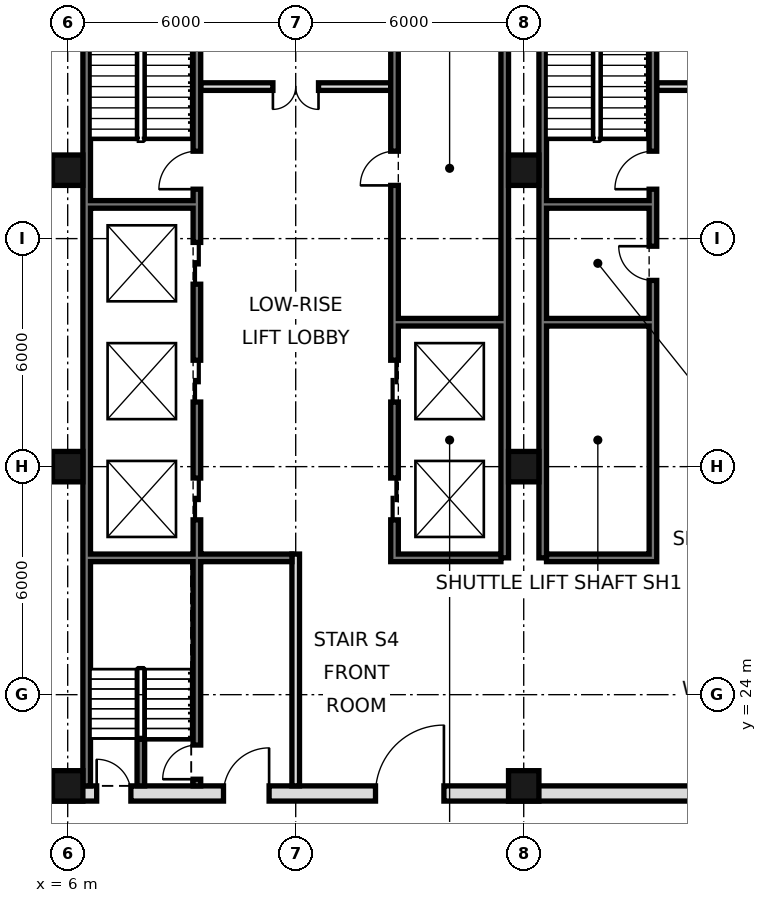
"""IFC4 building model, lengths in metres.
Left out: names, types, materials, properties, quantities, classifications, styles, units other than length and angle.
Written with IfcOpenShell. Run it as: python <this file> out.ifc"""

import sys

from ifc_helpers import new_model, si_unit, direction, frame, frame_2d, origin, origin_2d, place, context, subcontext, project, spatial, rectangle, hollow_rectangle, extrude, element, fill, save


model = new_model("IFC4")
c1 = context("Model", 3, precision=1e-05, world=origin(), true_north=direction((0.0, 1.0)))
c2 = subcontext(c1, "Body", "Model", "MODEL_VIEW")
j1 = project(units=[si_unit("LENGTHUNIT", "METRE"), si_unit("PLANEANGLEUNIT", "RADIAN")], contexts=[c1])
p1 = place(None, origin())
s1 = spatial("IfcSite", under=j1, at=p1, CompositionType="ELEMENT")
p2 = place(p1, origin())
s2 = spatial("IfcBuilding", under=s1, at=p2, CompositionType="ELEMENT")
p3 = place(p2, frame((0.0, 0.0, 44.4)))
s3 = spatial("IfcBuildingStorey", under=s2, at=p3, CompositionType="ELEMENT", Elevation=44.4)
for number, where, z_axis, x_axis in (
    (1, (6.0, 21.6, 0.0), (0.0, 0.0, 1.0), (1.0, 0.0, 0.0)),
    (2, (6.0, 30.0, 0.0), (0.0, 0.0, 1.0), (1.0, 0.0, 0.0)),
    (3, (6.0, 37.8, 0.0), (0.0, 0.0, 1.0), (1.0, 0.0, 0.0)),
    (4, (18.0, 21.6, 0.0), (0.0, 0.0, 1.0), (1.0, 0.0, 0.0)),
    (5, (18.0, 30.0, 0.0), (0.0, 0.0, 1.0), (1.0, 0.0, 0.0)),
    (6, (18.0, 37.8, 0.0), (0.0, 0.0, 1.0), (1.0, 0.0, 0.0)),
):
    element("IfcColumn", number, at=place(p3, frame(where, z_axis=z_axis, x_axis=x_axis)), inside=s3, PredefinedType="COLUMN", context=c2, shape_type="SweptSolid", body=[
        extrude(hollow_rectangle(XDim=0.8, YDim=0.8, WallThickness=0.07, at=origin_2d()), origin(), (0.0, 0.0, 1.0), 5.4),
    ])
p4 = place(p3, frame((6.5, 21.6, 0.0), z_axis=(0.0, 0.0, 1.0), x_axis=(0.0, 1.0, 0.0)))
e7 = element("IfcWall", 7, at=p4, inside=s3, PredefinedType="SOLIDWALL", context=c2, shape_type="SweptSolid", body=[
    extrude(rectangle(XDim=23.5, YDim=0.2, at=frame_2d((11.75, 0.0))), origin(), (0.0, 0.0, 1.0), 5.22),
])
for number, where, z_axis, x_axis in (
    (8, (17.5, 27.6, 0.0), (0.0, 0.0, 1.0), (0.0, 1.0, 0.0)),
    (9, (18.5, 27.6, 0.0), (0.0, 0.0, 1.0), (0.0, 1.0, 0.0)),
):
    element("IfcWall", number, at=place(p3, frame(where, z_axis=z_axis, x_axis=x_axis)), inside=s3, PredefinedType="SOLIDWALL", context=c2, shape_type="SweptSolid", body=[
        extrude(rectangle(XDim=17.5, YDim=0.2, at=frame_2d((8.75, 0.0))), origin(), (0.0, 0.0, 1.0), 5.22),
    ])
p5 = place(p3, frame((5.6, 21.4, 0.0), z_axis=(0.0, 0.0, 1.0), x_axis=(1.0, 0.0, 0.0)))
e10 = element("IfcWall", 10, at=p5, inside=s3, PredefinedType="SOLIDWALL", context=c2, shape_type="SweptSolid", body=[
    extrude(rectangle(XDim=36.8, YDim=0.4, at=frame_2d((18.4, 0.0))), origin(), (0.0, 0.0, 1.0), 5.22),
])
p6 = place(p5, frame((8.5, 0.0, 0.0)))
e11 = element("IfcOpeningElement", 11, at=p6, cuts=e10, PredefinedType="OPENING", context=c2, shape_type="SweptSolid", body=[
    extrude(rectangle(XDim=1.8, YDim=2.1, at=frame_2d((0.9, 1.05))), frame((0.0, 0.21, 0.0), z_axis=(0.0, -1.0, 0.0), x_axis=(1.0, 0.0, 0.0)), (0.0, 0.0, 1.0), 0.42),
])
p7 = place(p5, frame((17.5, 0.0, 0.0)))
e12 = element("IfcOpeningElement", 12, at=p7, cuts=e10, PredefinedType="OPENING", context=c2, shape_type="SweptSolid", body=[
    extrude(rectangle(XDim=1.8, YDim=2.1, at=frame_2d((0.9, 1.05))), frame((0.0, 0.21, 0.0), z_axis=(0.0, -1.0, 0.0), x_axis=(1.0, 0.0, 0.0)), (0.0, 0.0, 1.0), 0.42),
])
p8 = place(p5, frame((26.5, 0.0, 0.0)))
e13 = element("IfcOpeningElement", 13, at=p8, cuts=e10, PredefinedType="OPENING", context=c2, shape_type="SweptSolid", body=[
    extrude(rectangle(XDim=1.8, YDim=2.1, at=frame_2d((0.9, 1.05))), frame((0.0, 0.21, 0.0), z_axis=(0.0, -1.0, 0.0), x_axis=(1.0, 0.0, 0.0)), (0.0, 0.0, 1.0), 0.42),
])
p9 = place(p5, frame((4.5, 0.0, 0.0)))
e14 = element("IfcOpeningElement", 14, at=p9, cuts=e10, PredefinedType="OPENING", context=c2, shape_type="SweptSolid", body=[
    extrude(rectangle(XDim=1.2, YDim=2.1, at=frame_2d((0.6, 1.05))), frame((0.0, 0.21, 0.0), z_axis=(0.0, -1.0, 0.0), x_axis=(1.0, 0.0, 0.0)), (0.0, 0.0, 1.0), 0.42),
])
p10 = place(p5, frame((31.1, 0.0, 0.0)))
e15 = element("IfcOpeningElement", 15, at=p10, cuts=e10, PredefinedType="OPENING", context=c2, shape_type="SweptSolid", body=[
    extrude(rectangle(XDim=1.2, YDim=2.1, at=frame_2d((0.6, 1.05))), frame((0.0, 0.21, 0.0), z_axis=(0.0, -1.0, 0.0), x_axis=(1.0, 0.0, 0.0)), (0.0, 0.0, 1.0), 0.42),
])
p11 = place(p5, frame((1.163, 0.0, 0.0)))
e16 = element("IfcOpeningElement", 16, at=p11, cuts=e10, PredefinedType="OPENING", context=c2, shape_type="SweptSolid", body=[
    extrude(rectangle(XDim=0.9, YDim=2.1, at=frame_2d((0.45, 1.05))), frame((0.0, 0.21, 0.0), z_axis=(0.0, -1.0, 0.0), x_axis=(1.0, 0.0, 0.0)), (0.0, 0.0, 1.0), 0.42),
])
p12 = place(p5, frame((34.738, 0.0, 0.0)))
e17 = element("IfcOpeningElement", 17, at=p12, cuts=e10, PredefinedType="OPENING", context=c2, shape_type="SweptSolid", body=[
    extrude(rectangle(XDim=0.9, YDim=2.1, at=frame_2d((0.45, 1.05))), frame((0.0, 0.21, 0.0), z_axis=(0.0, -1.0, 0.0), x_axis=(1.0, 0.0, 0.0)), (0.0, 0.0, 1.0), 0.42),
])
p13 = place(p3, frame((12.0, 21.6, 0.0), z_axis=(0.0, 0.0, 1.0), x_axis=(0.0, 1.0, 0.0)))
e18 = element("IfcWall", 18, at=p13, inside=s3, PredefinedType="PARTITIONING", context=c2, shape_type="SweptSolid", body=[
    extrude(rectangle(XDim=6.1, YDim=0.2, at=frame_2d((3.05, 0.0))), origin(), (0.0, 0.0, 1.0), 5.22),
])
p14 = place(p3, frame((14.6, 27.5, 0.0), z_axis=(0.0, 0.0, 1.0), x_axis=(0.0, 1.0, 0.0)))
e19 = element("IfcWall", 19, at=p14, inside=s3, PredefinedType="SOLIDWALL", context=c2, shape_type="SweptSolid", body=[
    extrude(rectangle(XDim=17.5, YDim=0.2, at=frame_2d((8.75, 0.0))), origin(), (0.0, 0.0, 1.0), 5.22),
])
p15 = place(p14, frame((1.1, 0.0, 0.0)))
e20 = element("IfcOpeningElement", 20, at=p15, cuts=e19, PredefinedType="OPENING", context=c2, shape_type="SweptSolid", body=[
    extrude(rectangle(XDim=1.1, YDim=2.1, at=frame_2d((0.55, 1.05))), frame((0.0, 0.11, 0.0), z_axis=(0.0, -1.0, 0.0), x_axis=(1.0, 0.0, 0.0)), (0.0, 0.0, 1.0), 0.22),
])
p16 = place(p14, frame((4.2, 0.0, 0.0)))
e21 = element("IfcOpeningElement", 21, at=p16, cuts=e19, PredefinedType="OPENING", context=c2, shape_type="SweptSolid", body=[
    extrude(rectangle(XDim=1.1, YDim=2.1, at=frame_2d((0.55, 1.05))), frame((0.0, 0.11, 0.0), z_axis=(0.0, -1.0, 0.0), x_axis=(1.0, 0.0, 0.0)), (0.0, 0.0, 1.0), 0.22),
])
p17 = place(p14, frame((15.4, 0.0, 0.0)))
e22 = element("IfcOpeningElement", 22, at=p17, cuts=e19, PredefinedType="OPENING", context=c2, shape_type="SweptSolid", body=[
    extrude(rectangle(XDim=1.1, YDim=2.1, at=frame_2d((0.55, 1.05))), frame((0.0, 0.11, 0.0), z_axis=(0.0, -1.0, 0.0), x_axis=(1.0, 0.0, 0.0)), (0.0, 0.0, 1.0), 0.22),
])
p18 = place(p14, frame((9.9, 0.0, 0.0)))
e23 = element("IfcOpeningElement", 23, at=p18, cuts=e19, PredefinedType="OPENING", context=c2, shape_type="SweptSolid", body=[
    extrude(rectangle(XDim=0.9, YDim=2.1, at=frame_2d((0.45, 1.05))), frame((0.0, 0.11, 0.0), z_axis=(0.0, -1.0, 0.0), x_axis=(1.0, 0.0, 0.0)), (0.0, 0.0, 1.0), 0.22),
])
p19 = place(p3, frame((21.4, 27.5, 0.0), z_axis=(0.0, 0.0, 1.0), x_axis=(0.0, 1.0, 0.0)))
e24 = element("IfcWall", 24, at=p19, inside=s3, PredefinedType="SOLIDWALL", context=c2, shape_type="SweptSolid", body=[
    extrude(rectangle(XDim=17.5, YDim=0.2, at=frame_2d((8.75, 0.0))), origin(), (0.0, 0.0, 1.0), 5.22),
])
p20 = place(p19, frame((16.2, 0.0, 0.0)))
e25 = element("IfcOpeningElement", 25, at=p20, cuts=e24, PredefinedType="OPENING", context=c2, shape_type="SweptSolid", body=[
    extrude(rectangle(XDim=1.0, YDim=2.1, at=frame_2d((0.5, 1.05))), frame((0.0, 0.11, 0.0), z_axis=(0.0, -1.0, 0.0), x_axis=(1.0, 0.0, 0.0)), (0.0, 0.0, 1.0), 0.22),
])
p21 = place(p19, frame((9.8, 0.0, 0.0)))
e26 = element("IfcOpeningElement", 26, at=p21, cuts=e24, PredefinedType="OPENING", context=c2, shape_type="SweptSolid", body=[
    extrude(rectangle(XDim=1.0, YDim=2.1, at=frame_2d((0.5, 1.05))), frame((0.0, 0.11, 0.0), z_axis=(0.0, -1.0, 0.0), x_axis=(1.0, 0.0, 0.0)), (0.0, 0.0, 1.0), 0.22),
])
p22 = place(p19, frame((7.4, 0.0, 0.0)))
e27 = element("IfcOpeningElement", 27, at=p22, cuts=e24, PredefinedType="OPENING", context=c2, shape_type="SweptSolid", body=[
    extrude(rectangle(XDim=0.9, YDim=2.1, at=frame_2d((0.45, 1.05))), frame((0.0, 0.11, 0.0), z_axis=(0.0, -1.0, 0.0), x_axis=(1.0, 0.0, 0.0)), (0.0, 0.0, 1.0), 0.22),
])
p23 = place(p3, frame((7.925, 21.6, 0.0), z_axis=(0.0, 0.0, 1.0), x_axis=(0.0, 1.0, 0.0)))
e28 = element("IfcWall", 28, at=p23, inside=s3, PredefinedType="SOLIDWALL", context=c2, shape_type="SweptSolid", body=[
    extrude(rectangle(XDim=1.25, YDim=0.2, at=frame_2d((0.625, 0.0))), origin(), (0.0, 0.0, 1.0), 5.22),
])
p24 = place(p3, frame((9.4, 21.6, 0.0), z_axis=(0.0, 0.0, 1.0), x_axis=(0.0, 1.0, 0.0)))
e29 = element("IfcWall", 29, at=p24, inside=s3, PredefinedType="SOLIDWALL", context=c2, shape_type="SweptSolid", body=[
    extrude(rectangle(XDim=23.4, YDim=0.2, at=frame_2d((11.7, 0.0))), origin(), (0.0, 0.0, 1.0), 5.22),
])
p25 = place(p24, frame((7.0, 0.0, 0.0)))
e30 = element("IfcOpeningElement", 30, at=p25, cuts=e29, PredefinedType="OPENING", context=c2, shape_type="SweptSolid", body=[
    extrude(rectangle(XDim=1.1, YDim=2.1, at=frame_2d((0.55, 1.05))), frame((0.0, 0.11, 0.0), z_axis=(0.0, -1.0, 0.0), x_axis=(1.0, 0.0, 0.0)), (0.0, 0.0, 1.0), 0.22),
])
p26 = place(p24, frame((10.1, 0.0, 0.0)))
e31 = element("IfcOpeningElement", 31, at=p26, cuts=e29, PredefinedType="OPENING", context=c2, shape_type="SweptSolid", body=[
    extrude(rectangle(XDim=1.1, YDim=2.1, at=frame_2d((0.55, 1.05))), frame((0.0, 0.11, 0.0), z_axis=(0.0, -1.0, 0.0), x_axis=(1.0, 0.0, 0.0)), (0.0, 0.0, 1.0), 0.22),
])
p27 = place(p24, frame((13.2, 0.0, 0.0)))
e32 = element("IfcOpeningElement", 32, at=p27, cuts=e29, PredefinedType="OPENING", context=c2, shape_type="SweptSolid", body=[
    extrude(rectangle(XDim=1.1, YDim=2.1, at=frame_2d((0.55, 1.05))), frame((0.0, 0.11, 0.0), z_axis=(0.0, -1.0, 0.0), x_axis=(1.0, 0.0, 0.0)), (0.0, 0.0, 1.0), 0.22),
])
p28 = place(p24, frame((22.1, 0.0, 0.0)))
e33 = element("IfcOpeningElement", 33, at=p28, cuts=e29, PredefinedType="OPENING", context=c2, shape_type="SweptSolid", body=[
    extrude(rectangle(XDim=1.0, YDim=2.1, at=frame_2d((0.5, 1.05))), frame((0.0, 0.11, 0.0), z_axis=(0.0, -1.0, 0.0), x_axis=(1.0, 0.0, 0.0)), (0.0, 0.0, 1.0), 0.22),
])
p29 = place(p24, frame((15.7, 0.0, 0.0)))
e34 = element("IfcOpeningElement", 34, at=p29, cuts=e29, PredefinedType="OPENING", context=c2, shape_type="SweptSolid", body=[
    extrude(rectangle(XDim=1.0, YDim=2.1, at=frame_2d((0.5, 1.05))), frame((0.0, 0.11, 0.0), z_axis=(0.0, -1.0, 0.0), x_axis=(1.0, 0.0, 0.0)), (0.0, 0.0, 1.0), 0.22),
])
p30 = place(p24, frame((0.175, 0.0, 0.0)))
e35 = element("IfcOpeningElement", 35, at=p30, cuts=e29, PredefinedType="OPENING", context=c2, shape_type="SweptSolid", body=[
    extrude(rectangle(XDim=0.9, YDim=2.1, at=frame_2d((0.45, 1.05))), frame((0.0, 0.11, 0.0), z_axis=(0.0, -1.0, 0.0), x_axis=(1.0, 0.0, 0.0)), (0.0, 0.0, 1.0), 0.22),
])
for number, where, z_axis, x_axis in (
    (36, (14.7, 27.6, 0.0), (0.0, 0.0, 1.0), (1.0, 0.0, 0.0)),
    (37, (18.6, 27.6, 0.0), (0.0, 0.0, 1.0), (1.0, 0.0, 0.0)),
):
    element("IfcWall", number, at=place(p3, frame(where, z_axis=z_axis, x_axis=x_axis)), inside=s3, PredefinedType="SOLIDWALL", context=c2, shape_type="SweptSolid", body=[
        extrude(rectangle(XDim=2.7, YDim=0.2, at=frame_2d((1.35, 0.0))), origin(), (0.0, 0.0, 1.0), 5.22),
    ])
p31 = place(p3, frame((6.6, 27.6, 0.0), z_axis=(0.0, 0.0, 1.0), x_axis=(1.0, 0.0, 0.0)))
e38 = element("IfcWall", 38, at=p31, inside=s3, PredefinedType="SOLIDWALL", context=c2, shape_type="SweptSolid", body=[
    extrude(rectangle(XDim=5.3, YDim=0.2, at=frame_2d((2.65, 0.0))), origin(), (0.0, 0.0, 1.0), 5.22),
])
for number, where, z_axis, x_axis in (
    (39, (14.7, 33.8, 0.0), (0.0, 0.0, 1.0), (1.0, 0.0, 0.0)),
    (40, (18.6, 33.8, 0.0), (0.0, 0.0, 1.0), (1.0, 0.0, 0.0)),
    (41, (18.6, 36.9, 0.0), (0.0, 0.0, 1.0), (1.0, 0.0, 0.0)),
    (42, (6.6, 36.9, 0.0), (0.0, 0.0, 1.0), (1.0, 0.0, 0.0)),
):
    element("IfcWall", number, at=place(p3, frame(where, z_axis=z_axis, x_axis=x_axis)), inside=s3, PredefinedType="SOLIDWALL", context=c2, shape_type="SweptSolid", body=[
        extrude(rectangle(XDim=2.7, YDim=0.2, at=frame_2d((1.35, 0.0))), origin(), (0.0, 0.0, 1.0), 5.22),
    ])
p32 = place(p3, frame((21.5, 40.0, 0.0), z_axis=(0.0, 0.0, 1.0), x_axis=(1.0, 0.0, 0.0)))
e43 = element("IfcWall", 43, at=p32, inside=s3, PredefinedType="PARTITIONING", context=c2, shape_type="SweptSolid", body=[
    extrude(rectangle(XDim=7.9, YDim=0.2, at=frame_2d((3.95, 0.0))), origin(), (0.0, 0.0, 1.0), 5.22),
])
p33 = place(p32, frame((1.9, 0.0, 0.0)))
e44 = element("IfcOpeningElement", 44, at=p33, cuts=e43, PredefinedType="OPENING", context=c2, shape_type="SweptSolid", body=[
    extrude(rectangle(XDim=1.2, YDim=2.1, at=frame_2d((0.6, 1.05))), frame((0.0, 0.11, 0.0), z_axis=(0.0, -1.0, 0.0), x_axis=(1.0, 0.0, 0.0)), (0.0, 0.0, 1.0), 0.22),
])
p34 = place(p3, frame((9.5, 40.0, 0.0), z_axis=(0.0, 0.0, 1.0), x_axis=(1.0, 0.0, 0.0)))
e45 = element("IfcWall", 45, at=p34, inside=s3, PredefinedType="PARTITIONING", context=c2, shape_type="SweptSolid", body=[
    extrude(rectangle(XDim=5.0, YDim=0.2, at=frame_2d((2.5, 0.0))), origin(), (0.0, 0.0, 1.0), 5.22),
])
p35 = place(p34, frame((1.9, 0.0, 0.0)))
e46 = element("IfcOpeningElement", 46, at=p35, cuts=e45, PredefinedType="OPENING", context=c2, shape_type="SweptSolid", body=[
    extrude(rectangle(XDim=1.2, YDim=2.1, at=frame_2d((0.6, 1.05))), frame((0.0, 0.11, 0.0), z_axis=(0.0, -1.0, 0.0), x_axis=(1.0, 0.0, 0.0)), (0.0, 0.0, 1.0), 0.22),
])
p36 = place(p6, frame((1.8, 0.0, 0.0), z_axis=(0.0, 0.0, 1.0), x_axis=(-1.0, 0.0, 0.0)))
e47 = element("IfcDoor", 47, at=p36, inside=s3, OperationType="SINGLE_SWING_LEFT", PredefinedType="DOOR", context=c2, shape_type="SweptSolid", body=[
    extrude(rectangle(XDim=1.8, YDim=2.1, at=frame_2d((0.9, 1.05))), frame((0.0, 0.025, 0.0), z_axis=(0.0, -1.0, 0.0), x_axis=(1.0, 0.0, 0.0)), (0.0, 0.0, 1.0), 0.05),
])
fill(e11, e47)
p37 = place(p9, frame((1.2, 0.0, 0.0), z_axis=(0.0, 0.0, 1.0), x_axis=(-1.0, 0.0, 0.0)))
e48 = element("IfcDoor", 48, at=p37, inside=s3, OperationType="SINGLE_SWING_LEFT", PredefinedType="DOOR", context=c2, shape_type="SweptSolid", body=[
    extrude(rectangle(XDim=1.2, YDim=2.1, at=frame_2d((0.6, 1.05))), frame((0.0, 0.025, 0.0), z_axis=(0.0, -1.0, 0.0), x_axis=(1.0, 0.0, 0.0)), (0.0, 0.0, 1.0), 0.05),
])
fill(e14, e48)
p38 = place(p35, frame((1.2, 0.0, 0.0), z_axis=(0.0, 0.0, 1.0), x_axis=(-1.0, 0.0, 0.0)))
e49 = element("IfcDoor", 49, at=p38, inside=s3, OperationType="DOUBLE_DOOR_SINGLE_SWING", PredefinedType="DOOR", context=c2, shape_type="SweptSolid", body=[
    extrude(rectangle(XDim=1.2, YDim=2.1, at=frame_2d((0.6, 1.05))), frame((0.0, 0.025, 0.0), z_axis=(0.0, -1.0, 0.0), x_axis=(1.0, 0.0, 0.0)), (0.0, 0.0, 1.0), 0.05),
])
fill(e46, e49)
p39 = place(p15, origin())
e50 = element("IfcDoor", 50, at=p39, inside=s3, OperationType="DOUBLE_DOOR_SLIDING", PredefinedType="DOOR", context=c2, shape_type="SweptSolid", body=[
    extrude(rectangle(XDim=1.1, YDim=2.1, at=frame_2d((0.55, 1.05))), frame((0.0, 0.025, 0.0), z_axis=(0.0, -1.0, 0.0), x_axis=(1.0, 0.0, 0.0)), (0.0, 0.0, 1.0), 0.05),
])
fill(e20, e50)
p40 = place(p16, origin())
e51 = element("IfcDoor", 51, at=p40, inside=s3, OperationType="DOUBLE_DOOR_SLIDING", PredefinedType="DOOR", context=c2, shape_type="SweptSolid", body=[
    extrude(rectangle(XDim=1.1, YDim=2.1, at=frame_2d((0.55, 1.05))), frame((0.0, 0.025, 0.0), z_axis=(0.0, -1.0, 0.0), x_axis=(1.0, 0.0, 0.0)), (0.0, 0.0, 1.0), 0.05),
])
fill(e21, e51)
p41 = place(p25, origin())
e52 = element("IfcDoor", 52, at=p41, inside=s3, OperationType="DOUBLE_DOOR_SLIDING", PredefinedType="DOOR", context=c2, shape_type="SweptSolid", body=[
    extrude(rectangle(XDim=1.1, YDim=2.1, at=frame_2d((0.55, 1.05))), frame((0.0, 0.025, 0.0), z_axis=(0.0, -1.0, 0.0), x_axis=(1.0, 0.0, 0.0)), (0.0, 0.0, 1.0), 0.05),
])
fill(e30, e52)
p42 = place(p26, origin())
e53 = element("IfcDoor", 53, at=p42, inside=s3, OperationType="DOUBLE_DOOR_SLIDING", PredefinedType="DOOR", context=c2, shape_type="SweptSolid", body=[
    extrude(rectangle(XDim=1.1, YDim=2.1, at=frame_2d((0.55, 1.05))), frame((0.0, 0.025, 0.0), z_axis=(0.0, -1.0, 0.0), x_axis=(1.0, 0.0, 0.0)), (0.0, 0.0, 1.0), 0.05),
])
fill(e31, e53)
p43 = place(p27, origin())
e54 = element("IfcDoor", 54, at=p43, inside=s3, OperationType="DOUBLE_DOOR_SLIDING", PredefinedType="DOOR", context=c2, shape_type="SweptSolid", body=[
    extrude(rectangle(XDim=1.1, YDim=2.1, at=frame_2d((0.55, 1.05))), frame((0.0, 0.025, 0.0), z_axis=(0.0, -1.0, 0.0), x_axis=(1.0, 0.0, 0.0)), (0.0, 0.0, 1.0), 0.05),
])
fill(e32, e54)
p44 = place(p29, origin())
e55 = element("IfcDoor", 55, at=p44, inside=s3, OperationType="SINGLE_SWING_LEFT", PredefinedType="DOOR", context=c2, shape_type="SweptSolid", body=[
    extrude(rectangle(XDim=1.0, YDim=2.1, at=frame_2d((0.5, 1.05))), frame((0.0, 0.025, 0.0), z_axis=(0.0, -1.0, 0.0), x_axis=(1.0, 0.0, 0.0)), (0.0, 0.0, 1.0), 0.05),
])
fill(e34, e55)
p45 = place(p21, origin())
e56 = element("IfcDoor", 56, at=p45, inside=s3, OperationType="SINGLE_SWING_LEFT", PredefinedType="DOOR", context=c2, shape_type="SweptSolid", body=[
    extrude(rectangle(XDim=1.0, YDim=2.1, at=frame_2d((0.5, 1.05))), frame((0.0, 0.025, 0.0), z_axis=(0.0, -1.0, 0.0), x_axis=(1.0, 0.0, 0.0)), (0.0, 0.0, 1.0), 0.05),
])
fill(e26, e56)
p46 = place(p11, origin())
e57 = element("IfcDoor", 57, at=p46, inside=s3, OperationType="SINGLE_SWING_LEFT", PredefinedType="DOOR", context=c2, shape_type="SweptSolid", body=[
    extrude(rectangle(XDim=0.9, YDim=2.1, at=frame_2d((0.45, 1.05))), frame((0.0, 0.025, 0.0), z_axis=(0.0, -1.0, 0.0), x_axis=(1.0, 0.0, 0.0)), (0.0, 0.0, 1.0), 0.05),
])
fill(e16, e57)
p47 = place(p30, origin())
e58 = element("IfcDoor", 58, at=p47, inside=s3, OperationType="SINGLE_SWING_LEFT", PredefinedType="DOOR", context=c2, shape_type="SweptSolid", body=[
    extrude(rectangle(XDim=0.9, YDim=2.1, at=frame_2d((0.45, 1.05))), frame((0.0, 0.025, 0.0), z_axis=(0.0, -1.0, 0.0), x_axis=(1.0, 0.0, 0.0)), (0.0, 0.0, 1.0), 0.05),
])
fill(e35, e58)
p48 = place(p18, origin())
e59 = element("IfcDoor", 59, at=p48, inside=s3, OperationType="SINGLE_SWING_LEFT", PredefinedType="DOOR", context=c2, shape_type="SweptSolid", body=[
    extrude(rectangle(XDim=0.9, YDim=2.1, at=frame_2d((0.45, 1.05))), frame((0.0, 0.025, 0.0), z_axis=(0.0, -1.0, 0.0), x_axis=(1.0, 0.0, 0.0)), (0.0, 0.0, 1.0), 0.05),
])
fill(e23, e59)
p49 = place(p22, frame((0.9, 0.0, 0.0), z_axis=(0.0, 0.0, 1.0), x_axis=(-1.0, 0.0, 0.0)))
e60 = element("IfcDoor", 60, at=p49, inside=s3, OperationType="SINGLE_SWING_LEFT", PredefinedType="DOOR", context=c2, shape_type="SweptSolid", body=[
    extrude(rectangle(XDim=0.9, YDim=2.1, at=frame_2d((0.45, 1.05))), frame((0.0, 0.025, 0.0), z_axis=(0.0, -1.0, 0.0), x_axis=(1.0, 0.0, 0.0)), (0.0, 0.0, 1.0), 0.05),
])
fill(e27, e60)
save(model, sys.argv[1])
